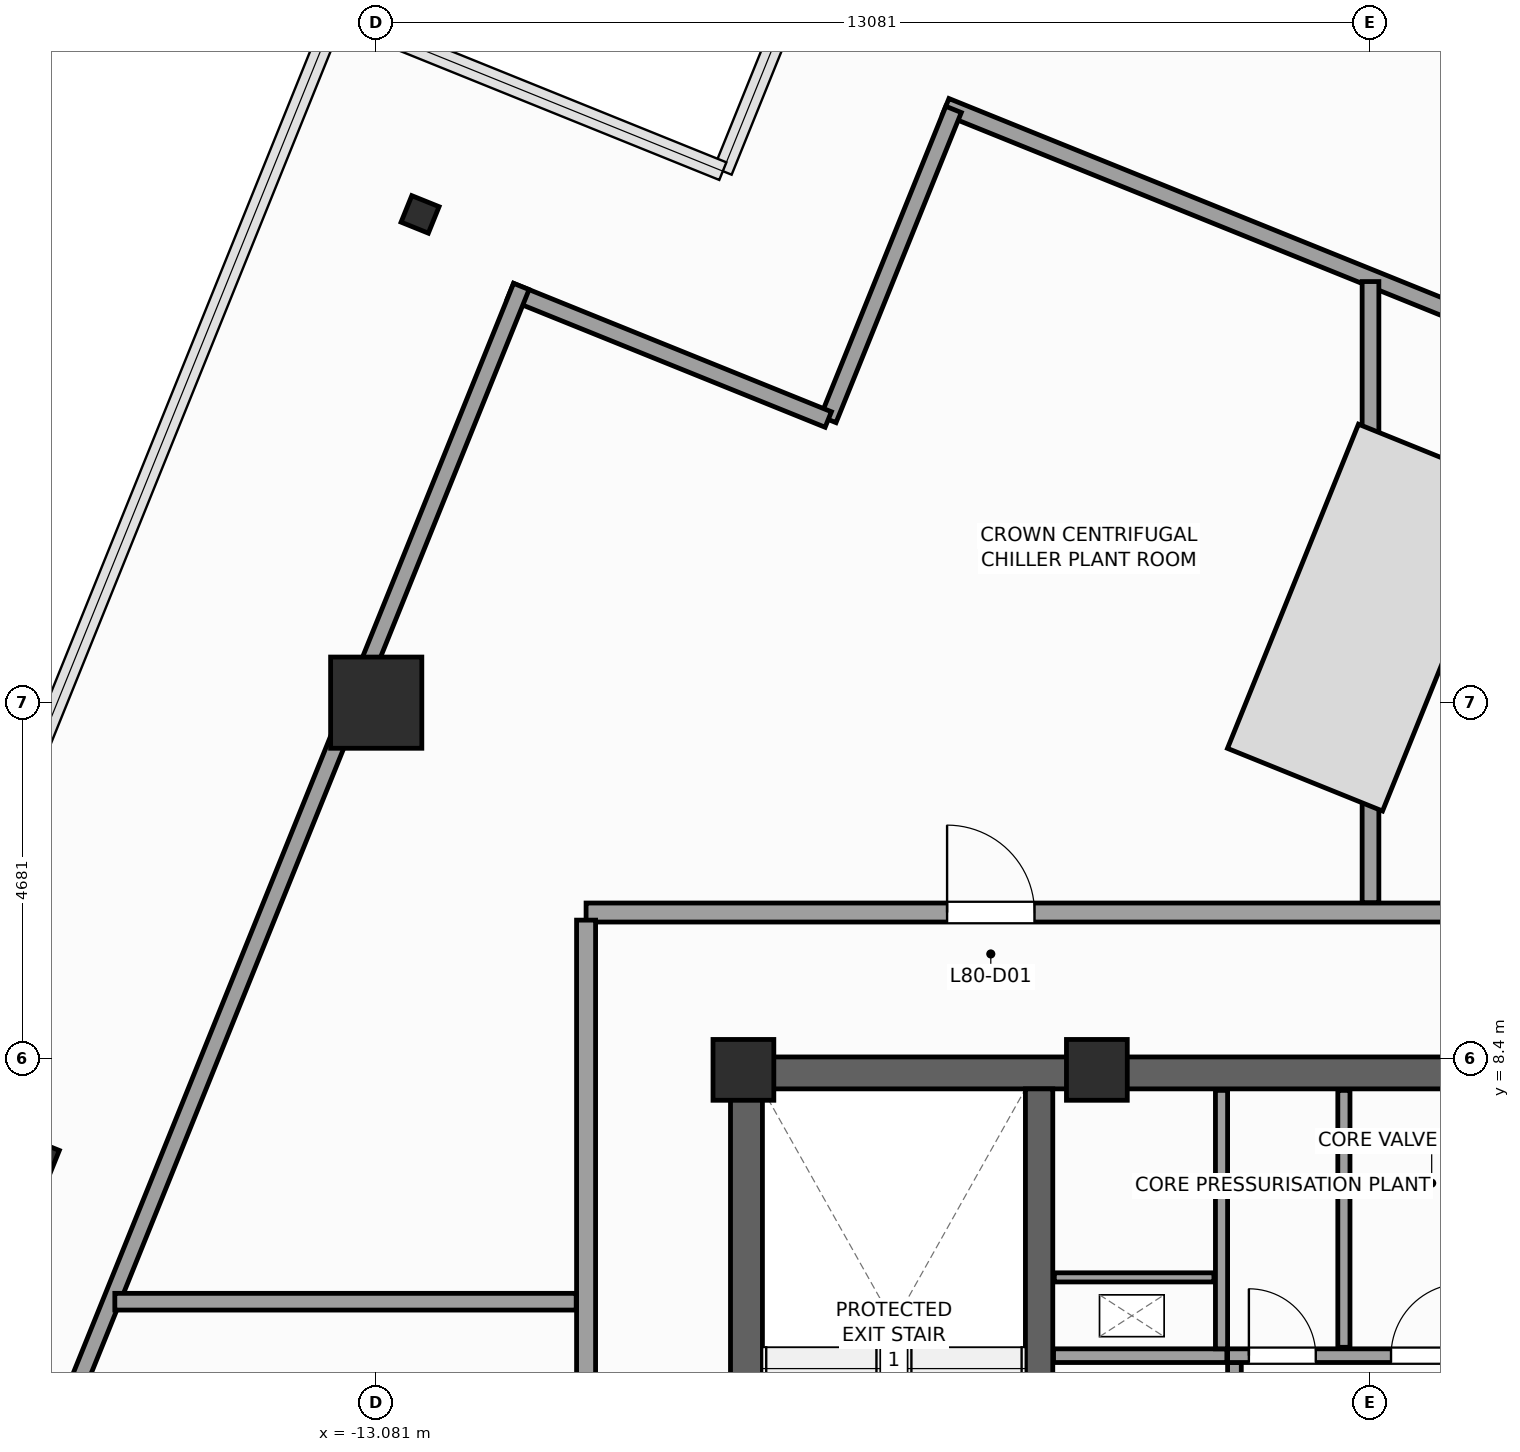
"""IFC4 building model, lengths in metres.
Left out: names, types, materials, properties, quantities, classifications, styles, units other than length and angle.
Written with IfcOpenShell. Run it as: python <this file> out.ifc"""

import sys

from ifc_helpers import new_model, si_unit, direction, frame, frame_2d, origin, origin_2d, place, context, subcontext, project, spatial, rectangle, i_section, extrude, source, transform, mapped, element, fill, save


model = new_model("IFC4")
c1 = context("Model", 3, precision=1e-05, world=origin(), true_north=direction((0.0, 1.0)))
c2 = subcontext(c1, "Body", "Model", "MODEL_VIEW")
j1 = project(units=[si_unit("LENGTHUNIT", "METRE"), si_unit("PLANEANGLEUNIT", "RADIAN")], contexts=[c1])
p1 = place(None, origin())
s1 = spatial("IfcSite", under=j1, at=p1, CompositionType="ELEMENT")
p2 = place(p1, origin())
s2 = spatial("IfcBuilding", under=s1, at=p2, CompositionType="ELEMENT")
p3 = place(p2, frame((0.0, 0.0, 325.6)))
s3 = spatial("IfcBuildingStorey", under=s2, at=p3, CompositionType="ELEMENT", Elevation=325.6)
p4 = place(p3, frame((-8.42, 8.21, 0.0), z_axis=(0.0, 0.0, 1.0), x_axis=(1.0, 0.0, 0.0)))
e1 = element("IfcWall", 1, at=p4, inside=s3, PredefinedType="SHEAR", context=c2, shape_type="SweptSolid", body=[
    extrude(rectangle(XDim=16.84, YDim=0.42, at=frame_2d((8.42, 0.0))), origin(), (0.0, 0.0, 1.0), 4.0),
])
p5 = place(p3, frame((-8.21, -8.0, 0.0), z_axis=(0.0, 0.0, 1.0), x_axis=(0.0, 1.0, 0.0)))
e2 = element("IfcWall", 2, at=p5, inside=s3, PredefinedType="SHEAR", context=c2, shape_type="SweptSolid", body=[
    extrude(rectangle(XDim=16.0, YDim=0.42, at=frame_2d((8.0, 0.0))), origin(), (0.0, 0.0, 1.0), 4.0),
])
p6 = place(p5, frame((4.69, 0.0, 0.0)))
e3 = element("IfcOpeningElement", 3, at=p6, cuts=e2, PredefinedType="OPENING", context=c2, shape_type="SweptSolid", body=[
    extrude(rectangle(XDim=1.3, YDim=2.2, at=frame_2d((0.65, 1.1))), frame((0.0, 0.22, 0.0), z_axis=(0.0, -1.0, 0.0), x_axis=(1.0, 0.0, 0.0)), (0.0, 0.0, 1.0), 0.44),
])
p7 = place(p3, frame((-4.36, -8.0, 0.0), z_axis=(0.0, 0.0, 1.0), x_axis=(0.0, 1.0, 0.0)))
e4 = element("IfcWall", 4, at=p7, inside=s3, PredefinedType="SHEAR", context=c2, shape_type="SweptSolid", body=[
    extrude(rectangle(XDim=16.0, YDim=0.36, at=frame_2d((8.0, 0.0))), origin(), (0.0, 0.0, 1.0), 4.0),
])
m1 = source(origin(), c2, "Body", "SweptSolid", [
    extrude(rectangle(XDim=0.8, YDim=0.8, at=origin_2d()), origin(), (0.0, 0.0, 1.0), 4.0),
])
for number, where, z_axis, x_axis in (
    (5, (-8.25, 8.25, 0.0), (0.0, 0.0, 1.0), (1.0, 0.0, 0.0)),
    (6, (-3.6, 8.25, 0.0), (0.0, 0.0, 1.0), (1.0, 0.0, 0.0)),
):
    element("IfcColumn", number, at=place(p3, frame(where, z_axis=z_axis, x_axis=x_axis)), inside=s3, PredefinedType="PILASTER", context=c2, shape_type="MappedRepresentation", body=[
        mapped(m1, transform((0.0, 0.0, 0.0), scale=1.0)),
    ])
m2 = source(origin(), c2, "Body", "SweptSolid", [
    extrude(rectangle(XDim=1.2, YDim=1.2, at=origin_2d()), origin(), (0.0, 0.0, 1.0), 4.0),
])
p8 = place(p3, frame((-13.081, 13.081, 0.0), z_axis=(0.0, 0.0, 1.0), x_axis=(1.0, 0.0, 0.0)))
e7 = element("IfcColumn", 7, at=p8, inside=s3, PredefinedType="COLUMN", context=c2, shape_type="MappedRepresentation", body=[
    mapped(m2, transform((0.0, 0.0, 0.0), scale=1.0)),
])
m3 = source(origin(), c2, "Body", "SweptSolid", [
    extrude(i_section(OverallWidth=0.376, OverallDepth=0.387, WebThickness=0.02, FlangeThickness=0.032, FilletRadius=0.015, at=origin_2d()), origin(), (0.0, 0.0, 1.0), 4.0),
])
p9 = place(p3, frame((-12.504, 19.504, 0.0), z_axis=(0.0, 0.0, 1.0), x_axis=(0.374606593416, 0.927183854567, 0.0)))
e8 = element("IfcColumn", 8, at=p9, inside=s3, PredefinedType="COLUMN", context=c2, shape_type="MappedRepresentation", body=[
    mapped(m3, transform((0.0, 0.0, 0.0), scale=1.0)),
])
m4 = source(origin(), c2, "Body", "SweptSolid", [
    extrude(i_section(OverallWidth=0.409, OverallDepth=0.425, WebThickness=0.024, FlangeThickness=0.039, FilletRadius=0.015, at=origin_2d()), origin(), (0.0, 0.0, 1.0), 4.0),
])
p10 = place(p3, frame((-17.524, 7.08, 0.0), z_axis=(0.0, 0.0, 1.0), x_axis=(0.374606593416, 0.927183854567, 0.0)))
e9 = element("IfcColumn", 9, at=p10, inside=s3, PredefinedType="COLUMN", context=c2, shape_type="MappedRepresentation", body=[
    mapped(m4, transform((0.0, 0.0, 0.0), scale=1.0)),
])
p11 = place(p3, frame((-1.79, -7.98, 0.0), z_axis=(0.0, 0.0, 1.0), x_axis=(0.0, 1.0, 0.0)))
e10 = element("IfcWall", 10, at=p11, inside=s3, PredefinedType="PARTITIONING", context=c2, shape_type="SweptSolid", body=[
    extrude(rectangle(XDim=12.38, YDim=0.18, at=frame_2d((6.19, 0.0))), origin(), (0.0, 0.0, 1.0), 3.7),
])
p12 = place(p11, frame((1.4, 0.0, 0.0)))
e11 = element("IfcOpeningElement", 11, at=p12, cuts=e10, PredefinedType="OPENING", context=c2, shape_type="SweptSolid", body=[
    extrude(rectangle(XDim=1.15, YDim=2.25, at=frame_2d((0.575, 1.125))), frame((0.0, 0.1, 0.0), z_axis=(0.0, -1.0, 0.0), x_axis=(1.0, 0.0, 0.0)), (0.0, 0.0, 1.0), 0.2),
])
p13 = place(p11, frame((5.6, 0.0, 0.0)))
e12 = element("IfcOpeningElement", 12, at=p13, cuts=e10, PredefinedType="OPENING", context=c2, shape_type="SweptSolid", body=[
    extrude(rectangle(XDim=1.15, YDim=2.25, at=frame_2d((0.575, 1.125))), frame((0.0, 0.1, 0.0), z_axis=(0.0, -1.0, 0.0), x_axis=(1.0, 0.0, 0.0)), (0.0, 0.0, 1.0), 0.2),
])
p14 = place(p11, frame((9.8, 0.0, 0.0)))
e13 = element("IfcOpeningElement", 13, at=p14, cuts=e10, PredefinedType="OPENING", context=c2, shape_type="SweptSolid", body=[
    extrude(rectangle(XDim=1.15, YDim=2.25, at=frame_2d((0.575, 1.125))), frame((0.0, 0.1, 0.0), z_axis=(0.0, -1.0, 0.0), x_axis=(1.0, 0.0, 0.0)), (0.0, 0.0, 1.0), 0.2),
])
p15 = place(p3, frame((-1.88, 4.49, 0.0), z_axis=(0.0, 0.0, 1.0), x_axis=(1.0, 0.0, 0.0)))
e14 = element("IfcWall", 14, at=p15, inside=s3, PredefinedType="PARTITIONING", context=c2, shape_type="SweptSolid", body=[
    extrude(rectangle(XDim=3.76, YDim=0.18, at=frame_2d((1.88, 0.0))), origin(), (0.0, 0.0, 1.0), 3.7),
])
p16 = place(p15, frame((0.28, 0.0, 0.0)))
e15 = element("IfcOpeningElement", 15, at=p16, cuts=e14, PredefinedType="OPENING", context=c2, shape_type="SweptSolid", body=[
    extrude(rectangle(XDim=0.88, YDim=2.1, at=frame_2d((0.44, 1.05))), frame((0.0, 0.1, 0.0), z_axis=(0.0, -1.0, 0.0), x_axis=(1.0, 0.0, 0.0)), (0.0, 0.0, 1.0), 0.2),
])
p17 = place(p15, frame((2.15, 0.0, 0.0)))
e16 = element("IfcOpeningElement", 16, at=p17, cuts=e14, PredefinedType="OPENING", context=c2, shape_type="SweptSolid", body=[
    extrude(rectangle(XDim=0.95, YDim=2.1, at=frame_2d((0.475, 1.05))), frame((0.0, 0.1, 0.0), z_axis=(0.0, -1.0, 0.0), x_axis=(1.0, 0.0, 0.0)), (0.0, 0.0, 1.0), 0.2),
])
p18 = place(p3, frame((-4.17, 4.49, 0.0), z_axis=(0.0, 0.0, 1.0), x_axis=(1.0, 0.0, 0.0)))
e17 = element("IfcWall", 17, at=p18, inside=s3, PredefinedType="PARTITIONING", context=c2, shape_type="SweptSolid", body=[
    extrude(rectangle(XDim=2.28, YDim=0.18, at=frame_2d((1.14, 0.0))), origin(), (0.0, 0.0, 1.0), 3.7),
])
p19 = place(p3, frame((-1.96, 4.58, 0.0), z_axis=(0.0, 0.0, 1.0), x_axis=(0.0, 1.0, 0.0)))
e18 = element("IfcWall", 18, at=p19, inside=s3, PredefinedType="PARTITIONING", context=c2, shape_type="SweptSolid", body=[
    extrude(rectangle(XDim=3.4, YDim=0.16, at=frame_2d((1.7, 0.0))), origin(), (0.0, 0.0, 1.0), 3.7),
])
p20 = place(p3, frame((-4.16, 5.52, 0.0), z_axis=(0.0, 0.0, 1.0), x_axis=(1.0, 0.0, 0.0)))
e19 = element("IfcWall", 19, at=p20, inside=s3, PredefinedType="PARTITIONING", context=c2, shape_type="SweptSolid", body=[
    extrude(rectangle(XDim=2.1, YDim=0.12, at=frame_2d((1.05, 0.0))), origin(), (0.0, 0.0, 1.0), 3.7),
])
p21 = place(p3, frame((-0.35, 4.6, 0.0), z_axis=(0.0, 0.0, 1.0), x_axis=(0.0, 1.0, 0.0)))
e20 = element("IfcWall", 20, at=p21, inside=s3, PredefinedType="PARTITIONING", context=c2, shape_type="SweptSolid", body=[
    extrude(rectangle(XDim=3.38, YDim=0.16, at=frame_2d((1.69, 0.0))), origin(), (0.0, 0.0, 1.0), 3.7),
])
p22 = place(p3, frame((18.556, 11.172, 0.0), z_axis=(0.0, 0.0, 1.0), x_axis=(-0.927181788521, 0.374611707018, 0.0)))
e21 = element("IfcWall", 21, at=p22, inside=s3, PredefinedType="PARTITIONING", context=c2, shape_type="SweptSolid", body=[
    extrude(rectangle(XDim=26.04, YDim=0.22, at=frame_2d((13.02, 0.0))), origin(), (0.0, 0.0, 1.0), 3.05),
])
p23 = place(p3, frame((-5.486, 20.886, 0.0), z_axis=(0.0, 0.0, 1.0), x_axis=(-0.374593321469, -0.927189216671, 0.0)))
e22 = element("IfcWall", 22, at=p23, inside=s3, PredefinedType="PARTITIONING", context=c2, shape_type="SweptSolid", body=[
    extrude(rectangle(XDim=4.4, YDim=0.22, at=frame_2d((2.2, 0.0))), origin(), (0.0, 0.0, 1.0), 3.7),
])
p24 = place(p3, frame((-7.134, 16.806, 0.0), z_axis=(0.0, 0.0, 1.0), x_axis=(-0.927186885331, 0.374599091925, 0.0)))
e23 = element("IfcWall", 23, at=p24, inside=s3, PredefinedType="PARTITIONING", context=c2, shape_type="SweptSolid", body=[
    extrude(rectangle(XDim=4.51, YDim=0.22, at=frame_2d((2.255, 0.0))), origin(), (0.0, 0.0, 1.0), 3.7),
])
p25 = place(p3, frame((-11.172, 18.556, 0.0), z_axis=(0.0, 0.0, 1.0), x_axis=(-0.374611707018, -0.927181788521, 0.0)))
e24 = element("IfcWall", 24, at=p25, inside=s3, PredefinedType="PARTITIONING", context=c2, shape_type="SweptSolid", body=[
    extrude(rectangle(XDim=26.04, YDim=0.22, at=frame_2d((13.02, 0.0))), origin(), (0.0, 0.0, 1.0), 3.05),
])
p26 = place(p3, frame((-10.32, 10.32, 0.0), z_axis=(0.0, 0.0, 1.0), x_axis=(1.0, 0.0, 0.0)))
e25 = element("IfcWall", 25, at=p26, inside=s3, PredefinedType="PARTITIONING", context=c2, shape_type="SweptSolid", body=[
    extrude(rectangle(XDim=20.64, YDim=0.25, at=frame_2d((10.32, 0.0))), origin(), (0.0, 0.0, 1.0), 3.7),
])
p27 = place(p26, frame((4.75, 0.0, 0.0)))
e26 = element("IfcOpeningElement", 26, at=p27, cuts=e25, PredefinedType="OPENING", context=c2, shape_type="SweptSolid", body=[
    extrude(rectangle(XDim=1.15, YDim=2.25, at=frame_2d((0.575, 1.125))), frame((0.0, 0.135, 0.0), z_axis=(0.0, -1.0, 0.0), x_axis=(1.0, 0.0, 0.0)), (0.0, 0.0, 1.0), 0.27),
])
p28 = place(p26, frame((14.74, 0.0, 0.0)))
e27 = element("IfcOpeningElement", 27, at=p28, cuts=e25, PredefinedType="OPENING", context=c2, shape_type="SweptSolid", body=[
    extrude(rectangle(XDim=1.15, YDim=2.25, at=frame_2d((0.575, 1.125))), frame((0.0, 0.135, 0.0), z_axis=(0.0, -1.0, 0.0), x_axis=(1.0, 0.0, 0.0)), (0.0, 0.0, 1.0), 0.27),
])
p29 = place(p3, frame((-10.32, -10.22, 0.0), z_axis=(0.0, 0.0, 1.0), x_axis=(0.0, 1.0, 0.0)))
e28 = element("IfcWall", 28, at=p29, inside=s3, PredefinedType="PARTITIONING", context=c2, shape_type="SweptSolid", body=[
    extrude(rectangle(XDim=20.44, YDim=0.25, at=frame_2d((10.22, 0.0))), origin(), (0.0, 0.0, 1.0), 3.7),
])
p30 = place(p29, frame((9.645, 0.0, 0.0)))
e29 = element("IfcOpeningElement", 29, at=p30, cuts=e28, PredefinedType="OPENING", context=c2, shape_type="SweptSolid", body=[
    extrude(rectangle(XDim=1.15, YDim=2.25, at=frame_2d((0.575, 1.125))), frame((0.0, 0.135, 0.0), z_axis=(0.0, -1.0, 0.0), x_axis=(1.0, 0.0, 0.0)), (0.0, 0.0, 1.0), 0.27),
])
p31 = place(p3, frame((0.0, 10.45, 0.0), z_axis=(0.0, 0.0, 1.0), x_axis=(0.0, 1.0, 0.0)))
e30 = element("IfcWall", 30, at=p31, inside=s3, PredefinedType="PARTITIONING", context=c2, shape_type="SweptSolid", body=[
    extrude(rectangle(XDim=8.171, YDim=0.22, at=frame_2d((4.085, 0.0))), origin(), (0.0, 0.0, 1.0), 3.7),
])
p32 = place(p3, frame((-10.45, 5.2, 0.0), z_axis=(0.0, 0.0, 1.0), x_axis=(-1.0, 0.0, 0.0)))
e31 = element("IfcWall", 31, at=p32, inside=s3, PredefinedType="PARTITIONING", context=c2, shape_type="SweptSolid", body=[
    extrude(rectangle(XDim=6.07, YDim=0.22, at=frame_2d((3.035, 0.0))), origin(), (0.0, 0.0, 1.0), 3.7),
])
m5 = source(origin(), c2, "Body", "SweptSolid", [
    extrude(rectangle(XDim=0.88, YDim=2.1, at=frame_2d((0.44, 1.05))), frame((0.0, 0.025, 0.0), z_axis=(0.0, -1.0, 0.0), x_axis=(1.0, 0.0, 0.0)), (0.0, 0.0, 1.0), 0.05),
])
p33 = place(p16, origin())
e32 = element("IfcDoor", 32, at=p33, inside=s3, OperationType="SINGLE_SWING_LEFT", PredefinedType="DOOR", context=c2, shape_type="MappedRepresentation", body=[
    mapped(m5, transform((0.0, 0.0, 0.0), scale=1.0)),
])
fill(e15, e32)
m6 = source(origin(), c2, "Body", "SweptSolid", [
    extrude(rectangle(XDim=0.95, YDim=2.1, at=frame_2d((0.475, 1.05))), frame((0.0, 0.025, 0.0), z_axis=(0.0, -1.0, 0.0), x_axis=(1.0, 0.0, 0.0)), (0.0, 0.0, 1.0), 0.05),
])
p34 = place(p17, origin())
e33 = element("IfcDoor", 33, at=p34, inside=s3, OperationType="SINGLE_SWING_RIGHT", PredefinedType="DOOR", context=c2, shape_type="MappedRepresentation", body=[
    mapped(m6, transform((0.0, 0.0, 0.0), scale=1.0)),
])
fill(e16, e33)
m7 = source(origin(), c2, "Body", "SweptSolid", [
    extrude(rectangle(XDim=1.15, YDim=2.25, at=frame_2d((0.575, 1.125))), frame((0.0, 0.025, 0.0), z_axis=(0.0, -1.0, 0.0), x_axis=(1.0, 0.0, 0.0)), (0.0, 0.0, 1.0), 0.05),
])
p35 = place(p27, origin())
e34 = element("IfcDoor", 34, at=p35, inside=s3, OperationType="SINGLE_SWING_LEFT", PredefinedType="DOOR", context=c2, shape_type="MappedRepresentation", body=[
    mapped(m7, transform((0.0, 0.0, 0.0), scale=1.0)),
])
fill(e26, e34)
save(model, sys.argv[1])
